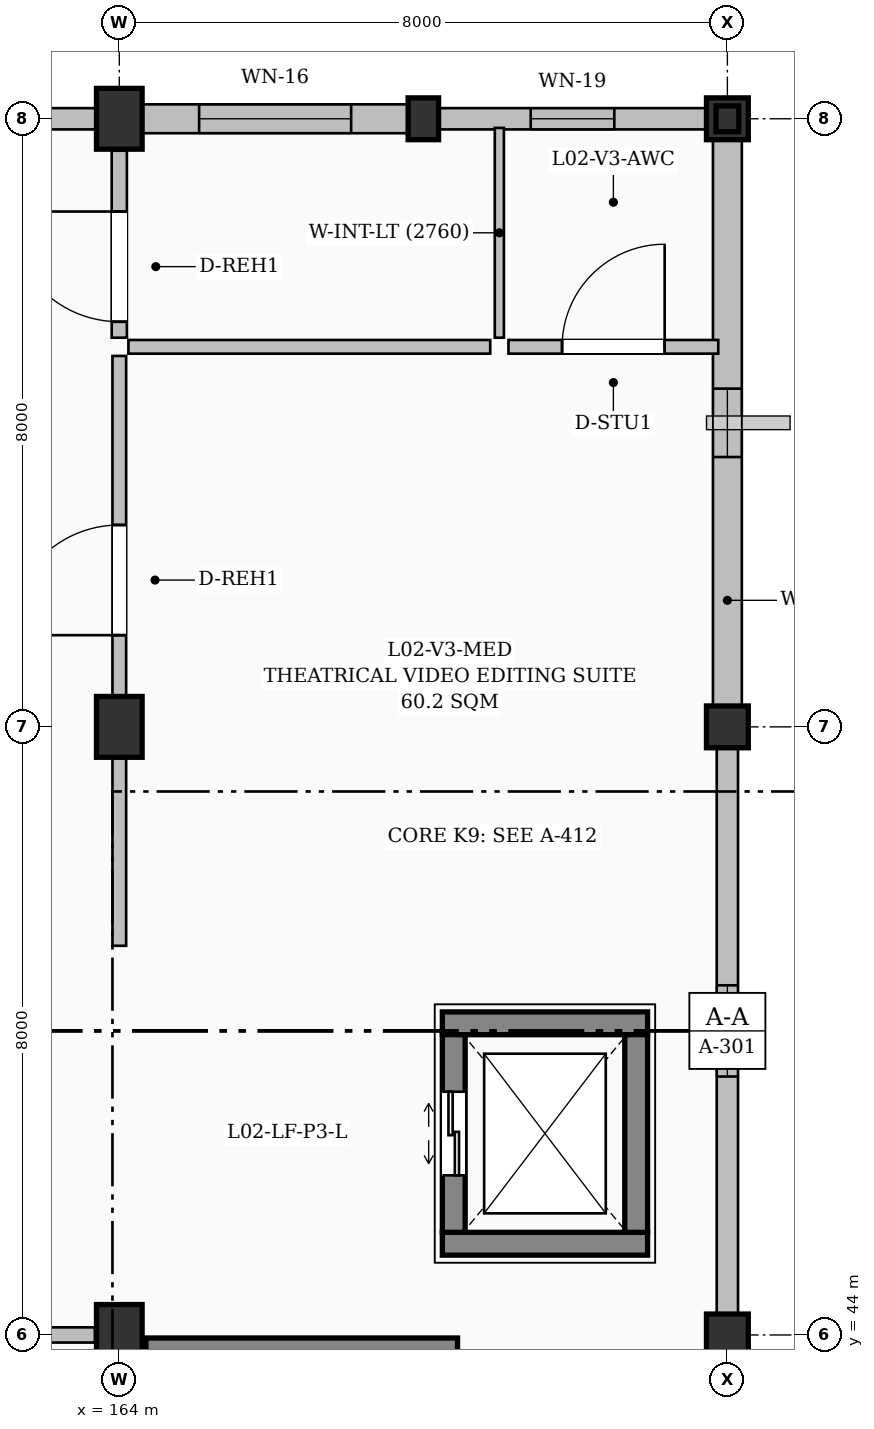
"""IFC4 building model, lengths in metres.
Left out: names, types, materials, properties, quantities, classifications, styles, units other than length and angle.
Written with IfcOpenShell. Run it as: python <this file> out.ifc"""

import sys

from ifc_helpers import new_model, si_unit, direction, frame, frame_2d, origin, origin_2d, place, context, subcontext, project, spatial, rectangle, i_section, extrude, element, fill, save


model = new_model("IFC4")
c1 = context("Model", 3, precision=1e-05, world=origin(), true_north=direction((0.0, 1.0)))
c2 = subcontext(c1, "Body", "Model", "MODEL_VIEW")
j1 = project(units=[si_unit("LENGTHUNIT", "METRE"), si_unit("PLANEANGLEUNIT", "RADIAN")], contexts=[c1])
p1 = place(None, origin())
s1 = spatial("IfcSite", under=j1, at=p1, CompositionType="ELEMENT")
p2 = place(p1, origin())
s2 = spatial("IfcBuilding", under=s1, at=p2, CompositionType="ELEMENT")
p3 = place(p2, frame((0.0, 0.0, 9.3)))
s3 = spatial("IfcBuildingStorey", under=s2, at=p3, CompositionType="ELEMENT", Elevation=9.3)
for number, where, z_axis, x_axis in (
    (1, (164.0, 44.0, 0.0), (0.0, 0.0, 1.0), (1.0, 0.0, 0.0)),
    (2, (164.0, 52.0, 0.0), (0.0, 0.0, 1.0), (1.0, 0.0, 0.0)),
    (3, (164.0, 60.0, 0.0), (0.0, 0.0, 1.0), (1.0, 0.0, 0.0)),
):
    element("IfcColumn", number, at=place(p3, frame(where, z_axis=z_axis, x_axis=x_axis)), inside=s3, PredefinedType="COLUMN", context=c2, shape_type="SweptSolid", body=[
        extrude(rectangle(XDim=0.6, YDim=0.8, at=origin_2d()), origin(), (0.0, 0.0, 1.0), 4.5),
    ])
p4 = place(p3, frame((168.0, 60.0, 0.0), z_axis=(0.0, 0.0, 1.0), x_axis=(1.0, 0.0, 0.0)))
e4 = element("IfcColumn", 4, at=p4, inside=s3, PredefinedType="PILASTER", context=c2, shape_type="SweptSolid", body=[
    extrude(rectangle(XDim=0.4, YDim=0.55, at=origin_2d()), origin(), (0.0, 0.0, 1.0), 4.5),
])
for number, where, z_axis, x_axis in (
    (5, (172.0, 44.0, 0.0), (0.0, 0.0, 1.0), (1.0, 0.0, 0.0)),
    (6, (172.0, 52.0, 0.0), (0.0, 0.0, 1.0), (1.0, 0.0, 0.0)),
    (7, (172.0, 60.0, 0.0), (0.0, 0.0, 1.0), (1.0, 0.0, 0.0)),
):
    element("IfcColumn", number, at=place(p3, frame(where, z_axis=z_axis, x_axis=x_axis)), inside=s3, PredefinedType="COLUMN", context=c2, shape_type="SweptSolid", body=[
        extrude(rectangle(XDim=0.55, YDim=0.55, at=origin_2d()), origin(), (0.0, 0.0, 1.0), 4.5),
    ])
p5 = place(p3, frame((172.0, 60.0, 4.5), z_axis=(0.0, 0.0, 1.0), x_axis=(1.0, 0.0, 0.0)))
e8 = element("IfcColumn", 8, at=p5, inside=s3, PredefinedType="COLUMN", context=c2, shape_type="SweptSolid", body=[
    extrude(i_section(OverallWidth=0.3, OverallDepth=0.34, WebThickness=0.012, FlangeThickness=0.021, FilletRadius=0.027, at=origin_2d()), origin(), (0.0, 0.0, 1.0), 1.566),
])
p6 = place(p3, frame((160.225, 60.0, 0.0), z_axis=(0.0, 0.0, 1.0), x_axis=(1.0, 0.0, 0.0)))
e9 = element("IfcWall", 9, at=p6, inside=s3, PredefinedType="SOLIDWALL", context=c2, shape_type="SweptSolid", body=[
    extrude(rectangle(XDim=3.475, YDim=0.28, at=frame_2d((1.737, 0.0))), origin(), (0.0, 0.0, 1.0), 4.125),
])
p7 = place(p6, frame((1.238, 0.0, 0.95)))
e10 = element("IfcOpeningElement", 10, at=p7, cuts=e9, PredefinedType="OPENING", context=c2, shape_type="SweptSolid", body=[
    extrude(rectangle(XDim=1.0, YDim=1.4, at=frame_2d((0.5, 0.7))), frame((0.0, 0.15, 0.0), z_axis=(0.0, -1.0, 0.0), x_axis=(1.0, 0.0, 0.0)), (0.0, 0.0, 1.0), 0.3),
])
p8 = place(p3, frame((164.3, 60.0, 0.0), z_axis=(0.0, 0.0, 1.0), x_axis=(1.0, 0.0, 0.0)))
e11 = element("IfcWall", 11, at=p8, inside=s3, PredefinedType="SOLIDWALL", context=c2, shape_type="SweptSolid", body=[
    extrude(rectangle(XDim=3.5, YDim=0.38, at=frame_2d((1.75, 0.0))), origin(), (0.0, 0.0, 1.0), 4.125),
])
p9 = place(p8, frame((0.75, 0.0, 0.95)))
e12 = element("IfcOpeningElement", 12, at=p9, cuts=e11, PredefinedType="OPENING", context=c2, shape_type="SweptSolid", body=[
    extrude(rectangle(XDim=2.0, YDim=1.2, at=frame_2d((1.0, 0.6))), frame((0.0, 0.2, 0.0), z_axis=(0.0, -1.0, 0.0), x_axis=(1.0, 0.0, 0.0)), (0.0, 0.0, 1.0), 0.4),
])
p10 = place(p3, frame((168.2, 60.0, 0.0), z_axis=(0.0, 0.0, 1.0), x_axis=(1.0, 0.0, 0.0)))
e13 = element("IfcWall", 13, at=p10, inside=s3, PredefinedType="SOLIDWALL", context=c2, shape_type="SweptSolid", body=[
    extrude(rectangle(XDim=3.525, YDim=0.28, at=frame_2d((1.763, 0.0))), origin(), (0.0, 0.0, 1.0), 4.125),
])
p11 = place(p10, frame((1.212, 0.0, 0.95)))
e14 = element("IfcOpeningElement", 14, at=p11, cuts=e13, PredefinedType="OPENING", context=c2, shape_type="SweptSolid", body=[
    extrude(rectangle(XDim=1.1, YDim=2.0, at=frame_2d((0.55, 1.0))), frame((0.0, 0.15, 0.0), z_axis=(0.0, -1.0, 0.0), x_axis=(1.0, 0.0, 0.0)), (0.0, 0.0, 1.0), 0.3),
])
p12 = place(p3, frame((172.0, 59.725, 0.0), z_axis=(0.0, 0.0, 1.0), x_axis=(0.0, -1.0, 0.0)))
e15 = element("IfcWall", 15, at=p12, inside=s3, PredefinedType="SOLIDWALL", context=c2, shape_type="SweptSolid", body=[
    extrude(rectangle(XDim=7.45, YDim=0.38, at=frame_2d((3.725, 0.0))), origin(), (0.0, 0.0, 1.0), 3.585),
])
p13 = place(p12, frame((3.275, 0.0, 0.95)))
e16 = element("IfcOpeningElement", 16, at=p13, cuts=e15, PredefinedType="OPENING", context=c2, shape_type="SweptSolid", body=[
    extrude(rectangle(XDim=0.9, YDim=1.8, at=frame_2d((0.45, 0.9))), frame((0.0, 0.2, 0.0), z_axis=(0.0, -1.0, 0.0), x_axis=(1.0, 0.0, 0.0)), (0.0, 0.0, 1.0), 0.4),
])
p14 = place(p3, frame((172.0, 51.725, 0.0), z_axis=(0.0, 0.0, 1.0), x_axis=(0.0, -1.0, 0.0)))
e17 = element("IfcWall", 17, at=p14, inside=s3, PredefinedType="SOLIDWALL", context=c2, shape_type="SweptSolid", body=[
    extrude(rectangle(XDim=7.45, YDim=0.28, at=frame_2d((3.725, 0.0))), origin(), (0.0, 0.0, 1.0), 3.585),
])
p15 = place(p14, frame((3.125, 0.0, 0.95)))
e18 = element("IfcOpeningElement", 18, at=p15, cuts=e17, PredefinedType="OPENING", context=c2, shape_type="SweptSolid", body=[
    extrude(rectangle(XDim=1.2, YDim=1.8, at=frame_2d((0.6, 0.9))), frame((0.0, 0.15, 0.0), z_axis=(0.0, -1.0, 0.0), x_axis=(1.0, 0.0, 0.0)), (0.0, 0.0, 1.0), 0.3),
])
p16 = place(p3, frame((168.45, 43.81, 0.0), z_axis=(0.0, 0.0, 1.0), x_axis=(-1.0, 0.0, 0.0)))
e19 = element("IfcWall", 19, at=p16, inside=s3, PredefinedType="SHEAR", context=c2, shape_type="SweptSolid", body=[
    extrude(rectangle(XDim=4.1, YDim=0.3, at=frame_2d((2.05, 0.0))), origin(), (0.0, 0.0, 1.0), 4.25),
])
for number, where, z_axis, x_axis in (
    (20, (168.25, 45.2, 0.0), (0.0, 0.0, 1.0), (1.0, 0.0, 0.0)),
    (21, (170.95, 48.1, 0.0), (0.0, 0.0, 1.0), (-1.0, 0.0, 0.0)),
):
    element("IfcWall", number, at=place(p3, frame(where, z_axis=z_axis, x_axis=x_axis)), inside=s3, PredefinedType="SHEAR", context=c2, shape_type="SweptSolid", body=[
        extrude(rectangle(XDim=2.7, YDim=0.3, at=frame_2d((1.35, 0.0))), origin(), (0.0, 0.0, 1.0), 4.25),
    ])
p17 = place(p3, frame((168.4, 45.35, 0.0), z_axis=(0.0, 0.0, 1.0), x_axis=(0.0, 1.0, 0.0)))
e22 = element("IfcWall", 22, at=p17, inside=s3, PredefinedType="SHEAR", context=c2, shape_type="SweptSolid", body=[
    extrude(rectangle(XDim=2.6, YDim=0.3, at=frame_2d((1.3, 0.0))), origin(), (0.0, 0.0, 1.0), 4.25),
])
p18 = place(p17, frame((0.75, 0.0, 0.0)))
e23 = element("IfcOpeningElement", 23, at=p18, cuts=e22, PredefinedType="OPENING", context=c2, shape_type="SweptSolid", body=[
    extrude(rectangle(XDim=1.1, YDim=2.15, at=frame_2d((0.55, 1.075))), frame((0.0, 0.16, 0.0), z_axis=(0.0, -1.0, 0.0), x_axis=(1.0, 0.0, 0.0)), (0.0, 0.0, 1.0), 0.32),
])
p19 = place(p3, frame((170.8, 47.95, 0.0), z_axis=(0.0, 0.0, 1.0), x_axis=(0.0, -1.0, 0.0)))
e24 = element("IfcWall", 24, at=p19, inside=s3, PredefinedType="SHEAR", context=c2, shape_type="SweptSolid", body=[
    extrude(rectangle(XDim=2.6, YDim=0.3, at=frame_2d((1.3, 0.0))), origin(), (0.0, 0.0, 1.0), 4.25),
])
p20 = place(p3, frame((156.37, 44.0, 0.0), z_axis=(0.0, 0.0, 1.0), x_axis=(1.0, 0.0, 0.0)))
e25 = element("IfcWall", 25, at=p20, inside=s3, PredefinedType="PARTITIONING", context=c2, shape_type="SweptSolid", body=[
    extrude(rectangle(XDim=7.31, YDim=0.2, at=frame_2d((3.655, 0.0))), origin(), (0.0, 0.0, 1.0), 4.25),
])
p21 = place(p20, frame((2.93, 0.0, 0.0)))
e26 = element("IfcOpeningElement", 26, at=p21, cuts=e25, PredefinedType="OPENING", context=c2, shape_type="SweptSolid", body=[
    extrude(rectangle(XDim=1.45, YDim=2.25, at=frame_2d((0.725, 1.125))), frame((0.0, 0.11, 0.0), z_axis=(0.0, -1.0, 0.0), x_axis=(1.0, 0.0, 0.0)), (0.0, 0.0, 1.0), 0.22),
])
p22 = place(p3, frame((164.0, 49.12, 0.0), z_axis=(0.0, 0.0, 1.0), x_axis=(0.0, 1.0, 0.0)))
e27 = element("IfcWall", 27, at=p22, inside=s3, PredefinedType="PARTITIONING", context=c2, shape_type="SweptSolid", body=[
    extrude(rectangle(XDim=7.76, YDim=0.18, at=frame_2d((3.88, 0.0))), origin(), (0.0, 0.0, 1.0), 4.25),
])
p23 = place(p22, frame((4.086, 0.0, 0.0)))
e28 = element("IfcOpeningElement", 28, at=p23, cuts=e27, PredefinedType="OPENING", context=c2, shape_type="SweptSolid", body=[
    extrude(rectangle(XDim=1.45, YDim=2.25, at=frame_2d((0.725, 1.125))), frame((0.0, 0.1, 0.0), z_axis=(0.0, -1.0, 0.0), x_axis=(1.0, 0.0, 0.0)), (0.0, 0.0, 1.0), 0.2),
])
p24 = place(p3, frame((164.0, 57.12, 0.0), z_axis=(0.0, 0.0, 1.0), x_axis=(0.0, 1.0, 0.0)))
e29 = element("IfcWall", 29, at=p24, inside=s3, PredefinedType="PARTITIONING", context=c2, shape_type="SweptSolid", body=[
    extrude(rectangle(XDim=2.46, YDim=0.2, at=frame_2d((1.23, 0.0))), origin(), (0.0, 0.0, 1.0), 4.25),
])
p25 = place(p24, frame((0.21, 0.0, 0.0)))
e30 = element("IfcOpeningElement", 30, at=p25, cuts=e29, PredefinedType="OPENING", context=c2, shape_type="SweptSolid", body=[
    extrude(rectangle(XDim=1.45, YDim=2.25, at=frame_2d((0.725, 1.125))), frame((0.0, 0.11, 0.0), z_axis=(0.0, -1.0, 0.0), x_axis=(1.0, 0.0, 0.0)), (0.0, 0.0, 1.0), 0.22),
])
p26 = place(p3, frame((169.12, 57.0, 0.0), z_axis=(0.0, 0.0, 1.0), x_axis=(1.0, 0.0, 0.0)))
e31 = element("IfcWall", 31, at=p26, inside=s3, PredefinedType="PARTITIONING", context=c2, shape_type="SweptSolid", body=[
    extrude(rectangle(XDim=2.76, YDim=0.18, at=frame_2d((1.38, 0.0))), origin(), (0.0, 0.0, 1.0), 4.25),
])
p27 = place(p26, frame((0.705, 0.0, 0.0)))
e32 = element("IfcOpeningElement", 32, at=p27, cuts=e31, PredefinedType="OPENING", context=c2, shape_type="SweptSolid", body=[
    extrude(rectangle(XDim=1.35, YDim=2.2, at=frame_2d((0.675, 1.1))), frame((0.0, 0.1, 0.0), z_axis=(0.0, -1.0, 0.0), x_axis=(1.0, 0.0, 0.0)), (0.0, 0.0, 1.0), 0.2),
])
p28 = place(p3, frame((164.12, 57.0, 0.0), z_axis=(0.0, 0.0, 1.0), x_axis=(1.0, 0.0, 0.0)))
e33 = element("IfcWall", 33, at=p28, inside=s3, PredefinedType="PARTITIONING", context=c2, shape_type="SweptSolid", body=[
    extrude(rectangle(XDim=4.76, YDim=0.18, at=frame_2d((2.38, 0.0))), origin(), (0.0, 0.0, 1.0), 4.25),
])
p29 = place(p3, frame((169.0, 57.12, 0.0), z_axis=(0.0, 0.0, 1.0), x_axis=(0.0, 1.0, 0.0)))
e34 = element("IfcWall", 34, at=p29, inside=s3, PredefinedType="PARTITIONING", context=c2, shape_type="SweptSolid", body=[
    extrude(rectangle(XDim=2.76, YDim=0.12, at=frame_2d((1.38, 0.0))), origin(), (0.0, 0.0, 1.0), 4.25),
])
p30 = place(p9, origin())
e35 = element("IfcWindow", 35, at=p30, inside=s3, PartitioningType="DOUBLE_PANEL_HORIZONTAL", PredefinedType="WINDOW", context=c2, shape_type="SweptSolid", body=[
    extrude(rectangle(XDim=2.0, YDim=1.2, at=frame_2d((1.0, 0.6))), frame((0.0, 0.03, 0.0), z_axis=(0.0, -1.0, 0.0), x_axis=(1.0, 0.0, 0.0)), (0.0, 0.0, 1.0), 0.06),
])
fill(e12, e35)
p31 = place(p11, origin())
e36 = element("IfcWindow", 36, at=p31, inside=s3, PartitioningType="SINGLE_PANEL", PredefinedType="WINDOW", context=c2, shape_type="SweptSolid", body=[
    extrude(rectangle(XDim=1.1, YDim=2.0, at=frame_2d((0.55, 1.0))), frame((0.0, 0.03, 0.0), z_axis=(0.0, -1.0, 0.0), x_axis=(1.0, 0.0, 0.0)), (0.0, 0.0, 1.0), 0.06),
])
fill(e14, e36)
p32 = place(p13, origin())
e37 = element("IfcWindow", 37, at=p32, inside=s3, PartitioningType="SINGLE_PANEL", PredefinedType="WINDOW", context=c2, shape_type="SweptSolid", body=[
    extrude(rectangle(XDim=0.9, YDim=1.8, at=frame_2d((0.45, 0.9))), frame((0.0, 0.03, 0.0), z_axis=(0.0, -1.0, 0.0), x_axis=(1.0, 0.0, 0.0)), (0.0, 0.0, 1.0), 0.06),
])
fill(e16, e37)
p33 = place(p15, origin())
e38 = element("IfcWindow", 38, at=p33, inside=s3, PartitioningType="SINGLE_PANEL", PredefinedType="WINDOW", context=c2, shape_type="SweptSolid", body=[
    extrude(rectangle(XDim=1.2, YDim=1.8, at=frame_2d((0.6, 0.9))), frame((0.0, 0.03, 0.0), z_axis=(0.0, -1.0, 0.0), x_axis=(1.0, 0.0, 0.0)), (0.0, 0.0, 1.0), 0.06),
])
fill(e18, e38)
p34 = place(p18, origin())
e39 = element("IfcDoor", 39, at=p34, inside=s3, OperationType="DOUBLE_DOOR_SLIDING", PredefinedType="DOOR", context=c2, shape_type="SweptSolid", body=[
    extrude(rectangle(XDim=1.1, YDim=2.15, at=frame_2d((0.55, 1.075))), frame((0.0, 0.025, 0.0), z_axis=(0.0, -1.0, 0.0), x_axis=(1.0, 0.0, 0.0)), (0.0, 0.0, 1.0), 0.05),
])
fill(e23, e39)
p35 = place(p23, origin())
e40 = element("IfcDoor", 40, at=p35, inside=s3, OperationType="SINGLE_SWING_LEFT", PredefinedType="DOOR", context=c2, shape_type="SweptSolid", body=[
    extrude(rectangle(XDim=1.45, YDim=2.25, at=frame_2d((0.725, 1.125))), frame((0.0, 0.025, 0.0), z_axis=(0.0, -1.0, 0.0), x_axis=(1.0, 0.0, 0.0)), (0.0, 0.0, 1.0), 0.05),
])
fill(e28, e40)
p36 = place(p25, origin())
e41 = element("IfcDoor", 41, at=p36, inside=s3, OperationType="SINGLE_SWING_RIGHT", PredefinedType="DOOR", context=c2, shape_type="SweptSolid", body=[
    extrude(rectangle(XDim=1.45, YDim=2.25, at=frame_2d((0.725, 1.125))), frame((0.0, 0.025, 0.0), z_axis=(0.0, -1.0, 0.0), x_axis=(1.0, 0.0, 0.0)), (0.0, 0.0, 1.0), 0.05),
])
fill(e30, e41)
p37 = place(p27, origin())
e42 = element("IfcDoor", 42, at=p37, inside=s3, OperationType="SINGLE_SWING_RIGHT", PredefinedType="DOOR", context=c2, shape_type="SweptSolid", body=[
    extrude(rectangle(XDim=1.35, YDim=2.2, at=frame_2d((0.675, 1.1))), frame((0.0, 0.025, 0.0), z_axis=(0.0, -1.0, 0.0), x_axis=(1.0, 0.0, 0.0)), (0.0, 0.0, 1.0), 0.05),
])
fill(e32, e42)
save(model, sys.argv[1])
